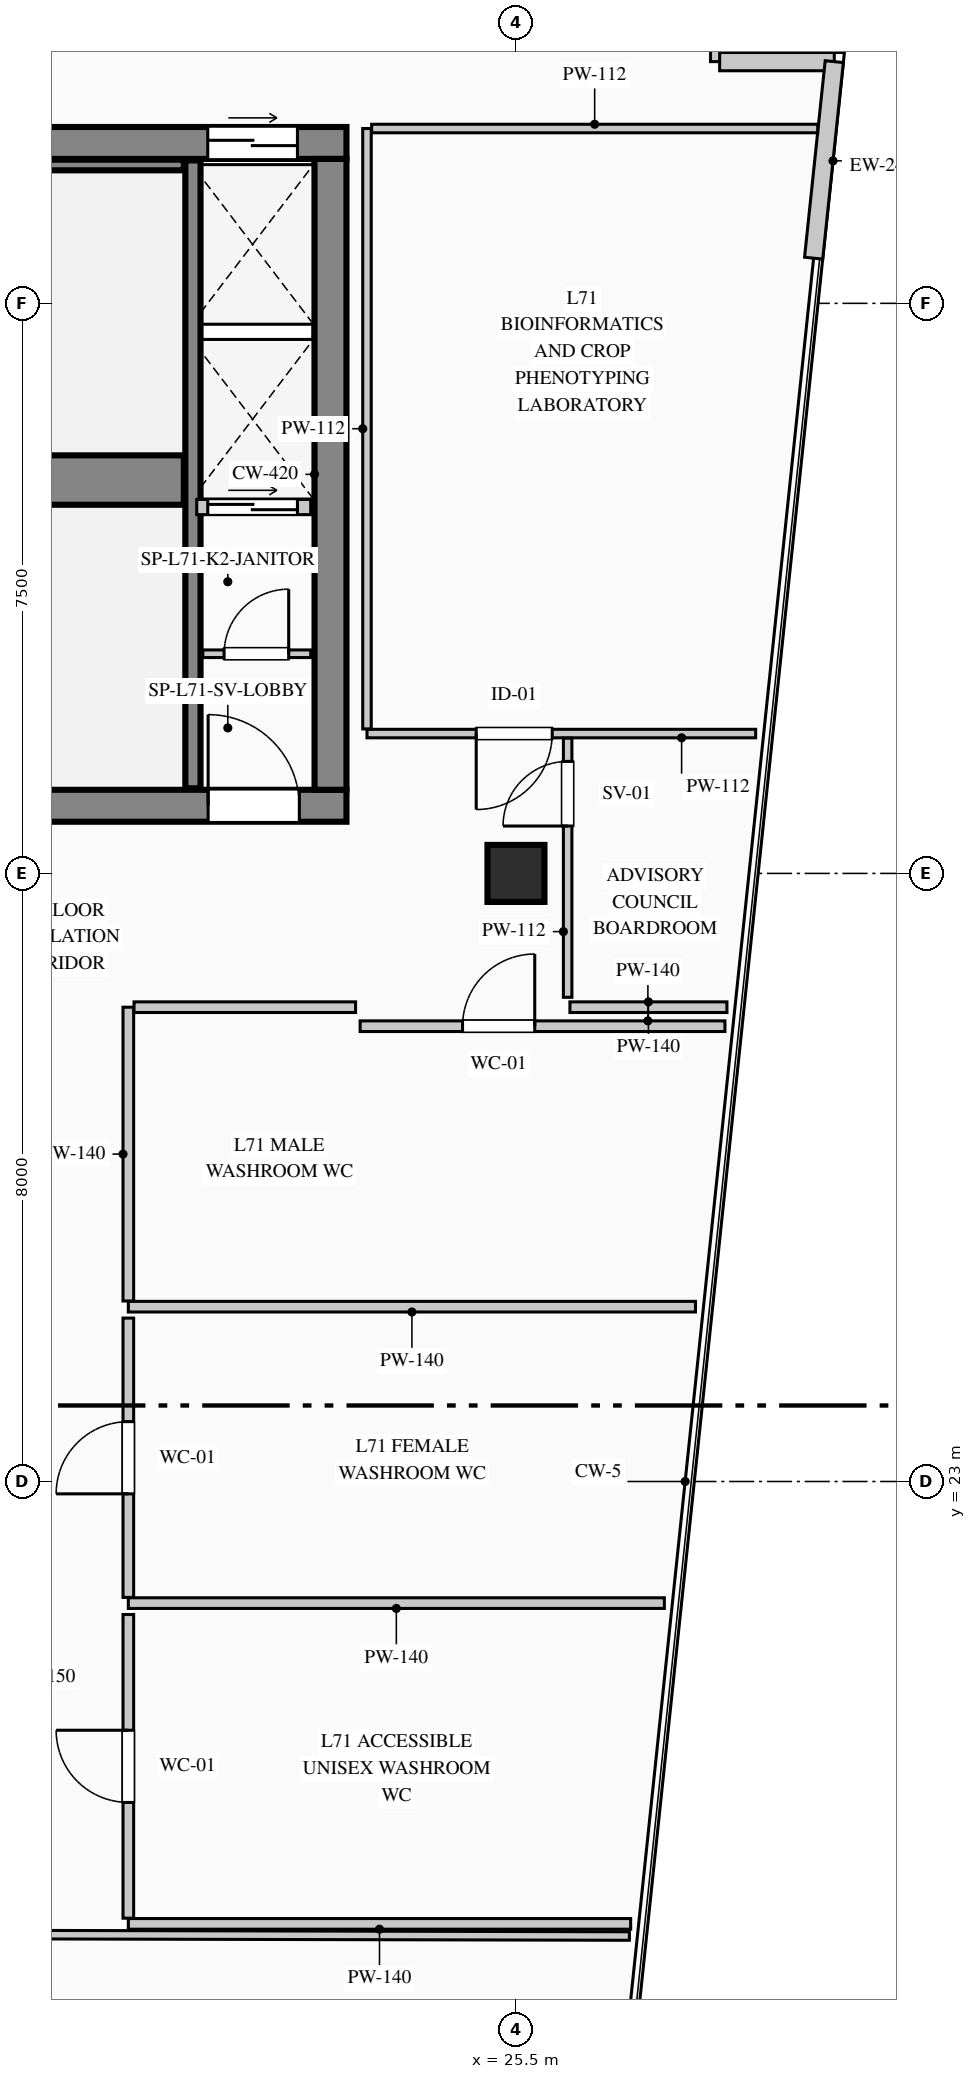
"""IFC4 building model, lengths in metres.
Left out: names, types, materials, properties, quantities, classifications, styles, units other than length and angle.
Written with IfcOpenShell. Run it as: python <this file> out.ifc"""

import sys

from ifc_helpers import new_model, si_unit, direction, frame, frame_2d, origin, origin_2d, place, context, subcontext, project, spatial, rectangle, extrude, element, fill, save


model = new_model("IFC4")
c1 = context("Model", 3, precision=1e-05, world=origin(), true_north=direction((0.0, 1.0)))
c2 = subcontext(c1, "Body", "Model", "MODEL_VIEW")
j1 = project(units=[si_unit("LENGTHUNIT", "METRE"), si_unit("PLANEANGLEUNIT", "RADIAN")], contexts=[c1])
p1 = place(None, origin())
s1 = spatial("IfcSite", under=j1, at=p1, CompositionType="ELEMENT")
p2 = place(p1, origin())
s2 = spatial("IfcBuilding", under=s1, at=p2, CompositionType="ELEMENT")
p3 = place(p2, frame((0.0, 0.0, 296.2)))
s3 = spatial("IfcBuildingStorey", under=s2, at=p3, CompositionType="ELEMENT", Elevation=296.2)
p4 = place(p3, frame((5.58, 40.61, 0.0), z_axis=(0.0, 0.0, 1.0), x_axis=(1.0, 0.0, 0.0)))
e1 = element("IfcWall", 1, at=p4, inside=s3, PredefinedType="SHEAR", context=c2, shape_type="SweptSolid", body=[
    extrude(rectangle(XDim=17.69, YDim=0.42, at=frame_2d((8.845, 0.0))), origin(), (0.0, 0.0, 1.0), 3.95),
])
p5 = place(p4, frame((15.865, 0.0, 0.0)))
e2 = element("IfcOpeningElement", 2, at=p5, cuts=e1, PredefinedType="OPENING", context=c2, shape_type="SweptSolid", body=[
    extrude(rectangle(XDim=1.18, YDim=2.25, at=frame_2d((0.59, 1.125))), frame((0.0, 0.22, 0.0), z_axis=(0.0, -1.0, 0.0), x_axis=(1.0, 0.0, 0.0)), (0.0, 0.0, 1.0), 0.44),
])
p6 = place(p3, frame((5.58, 31.89, 0.0), z_axis=(0.0, 0.0, 1.0), x_axis=(1.0, 0.0, 0.0)))
e3 = element("IfcWall", 3, at=p6, inside=s3, PredefinedType="SHEAR", context=c2, shape_type="SweptSolid", body=[
    extrude(rectangle(XDim=17.69, YDim=0.42, at=frame_2d((8.845, 0.0))), origin(), (0.0, 0.0, 1.0), 3.95),
])
p7 = place(p6, frame((3.07, 0.0, 0.0)))
e4 = element("IfcOpeningElement", 4, at=p7, cuts=e3, PredefinedType="OPENING", context=c2, shape_type="SweptSolid", body=[
    extrude(rectangle(XDim=1.2, YDim=2.2, at=frame_2d((0.6, 1.1))), frame((0.0, 0.22, 0.0), z_axis=(0.0, -1.0, 0.0), x_axis=(1.0, 0.0, 0.0)), (0.0, 0.0, 1.0), 0.44),
])
p8 = place(p6, frame((6.92, 0.0, 0.0)))
e5 = element("IfcOpeningElement", 5, at=p8, cuts=e3, PredefinedType="OPENING", context=c2, shape_type="SweptSolid", body=[
    extrude(rectangle(XDim=1.2, YDim=2.2, at=frame_2d((0.6, 1.1))), frame((0.0, 0.22, 0.0), z_axis=(0.0, -1.0, 0.0), x_axis=(1.0, 0.0, 0.0)), (0.0, 0.0, 1.0), 0.44),
])
p9 = place(p6, frame((8.77, 0.0, 0.0)))
e6 = element("IfcOpeningElement", 6, at=p9, cuts=e3, PredefinedType="OPENING", context=c2, shape_type="SweptSolid", body=[
    extrude(rectangle(XDim=1.15, YDim=2.2, at=frame_2d((0.575, 1.1))), frame((0.0, 0.22, 0.0), z_axis=(0.0, -1.0, 0.0), x_axis=(1.0, 0.0, 0.0)), (0.0, 0.0, 1.0), 0.44),
])
p10 = place(p6, frame((15.87, 0.0, 0.0)))
e7 = element("IfcOpeningElement", 7, at=p10, cuts=e3, PredefinedType="OPENING", context=c2, shape_type="SweptSolid", body=[
    extrude(rectangle(XDim=1.2, YDim=2.2, at=frame_2d((0.6, 1.1))), frame((0.0, 0.22, 0.0), z_axis=(0.0, -1.0, 0.0), x_axis=(1.0, 0.0, 0.0)), (0.0, 0.0, 1.0), 0.44),
])
p11 = place(p3, frame((23.06, 32.1, 0.0), z_axis=(0.0, 0.0, 1.0), x_axis=(0.0, 1.0, 0.0)))
e8 = element("IfcWall", 8, at=p11, inside=s3, PredefinedType="SHEAR", context=c2, shape_type="SweptSolid", body=[
    extrude(rectangle(XDim=8.3, YDim=0.42, at=frame_2d((4.15, 0.0))), origin(), (0.0, 0.0, 1.0), 3.95),
])
p12 = place(p3, frame((14.12, 36.175, 0.0), z_axis=(0.0, 0.0, 1.0), x_axis=(1.0, 0.0, 0.0)))
e9 = element("IfcWall", 9, at=p12, inside=s3, PredefinedType="SHEAR", context=c2, shape_type="SweptSolid", body=[
    extrude(rectangle(XDim=7.01, YDim=0.65, at=frame_2d((3.505, 0.0))), origin(), (0.0, 0.0, 1.0), 3.95),
])
p13 = place(p3, frame((21.25, 32.12, 0.0), z_axis=(0.0, 0.0, 1.0), x_axis=(0.0, 1.0, 0.0)))
e10 = element("IfcWall", 10, at=p13, inside=s3, PredefinedType="SHEAR", context=c2, shape_type="SweptSolid", body=[
    extrude(rectangle(XDim=8.26, YDim=0.2, at=frame_2d((4.13, 0.0))), origin(), (0.0, 0.0, 1.0), 3.95),
])
p14 = place(p3, frame((14.12, 40.32, 0.0), z_axis=(0.0, 0.0, 1.0), x_axis=(1.0, 0.0, 0.0)))
e11 = element("IfcWall", 11, at=p14, inside=s3, PredefinedType="SHEAR", context=c2, shape_type="SweptSolid", body=[
    extrude(rectangle(XDim=7.01, YDim=0.14, at=frame_2d((3.505, 0.0))), origin(), (0.0, 0.0, 1.0), 3.95),
])
p15 = place(p3, frame((25.5, 31.0, 0.0), z_axis=(0.0, 0.0, 1.0), x_axis=(1.0, 0.0, 0.0)))
e12 = element("IfcColumn", 12, at=p15, inside=s3, PredefinedType="COLUMN", context=c2, shape_type="SweptSolid", body=[
    extrude(rectangle(XDim=0.75, YDim=0.75, at=origin_2d()), origin(), (0.0, 0.0, 1.0), 3.95),
])
p16 = place(p3, frame((28.18, 43.38, 0.0), z_axis=(0.0, 0.0, 1.0), x_axis=(0.0, -1.0, 0.0)))
e13 = element("IfcWall", 13, at=p16, inside=s3, PredefinedType="STANDARD", context=c2, shape_type="SweptSolid", body=[
    extrude(rectangle(XDim=1.7, YDim=0.24, at=frame_2d((0.85, 0.0))), origin(), (0.0, 0.0, 1.0), 3.7),
])
p17 = place(p3, frame((28.18, 41.68, 0.0), z_axis=(0.0, 0.0, 1.0), x_axis=(1.0, 0.0, 0.0)))
e14 = element("IfcWall", 14, at=p17, inside=s3, PredefinedType="STANDARD", context=c2, shape_type="SweptSolid", body=[
    extrude(rectangle(XDim=1.508, YDim=0.24, at=frame_2d((0.754, 0.0))), origin(), (0.0, 0.0, 1.0), 3.7),
])
p18 = place(p3, frame((29.688, 41.68, 0.0), z_axis=(0.0, 0.0, 1.0), x_axis=(-0.104420821624, -0.994533203071, 0.0)))
e15 = element("IfcWall", 15, at=p18, inside=s3, PredefinedType="STANDARD", context=c2, shape_type="SweptSolid", body=[
    extrude(rectangle(XDim=2.6, YDim=0.24, at=frame_2d((1.3, 0.0))), origin(), (0.0, 0.0, 1.0), 3.7),
])
p19 = place(p3, frame((21.38, 33.89, 0.0), z_axis=(0.0, 0.0, 1.0), x_axis=(1.0, 0.0, 0.0)))
e16 = element("IfcWall", 16, at=p19, inside=s3, PredefinedType="PARTITIONING", context=c2, shape_type="SweptSolid", body=[
    extrude(rectangle(XDim=1.42, YDim=0.1, at=frame_2d((0.71, 0.0))), origin(), (0.0, 0.0, 1.0), 3.7),
])
p20 = place(p19, frame((0.28, 0.0, 0.0)))
e17 = element("IfcOpeningElement", 17, at=p20, cuts=e16, PredefinedType="OPENING", context=c2, shape_type="SweptSolid", body=[
    extrude(rectangle(XDim=0.85, YDim=2.1, at=frame_2d((0.425, 1.05))), frame((0.0, 0.06, 0.0), z_axis=(0.0, -1.0, 0.0), x_axis=(1.0, 0.0, 0.0)), (0.0, 0.0, 1.0), 0.12),
])
p21 = place(p3, frame((21.3, 35.82, 0.0), z_axis=(0.0, 0.0, 1.0), x_axis=(1.0, 0.0, 0.0)))
e18 = element("IfcWall", 18, at=p21, inside=s3, PredefinedType="PARTITIONING", context=c2, shape_type="SweptSolid", body=[
    extrude(rectangle(XDim=1.5, YDim=0.2, at=frame_2d((0.75, 0.0))), origin(), (0.0, 0.0, 1.0), 3.7),
])
p22 = place(p21, frame((0.145, 0.0, 0.0)))
e19 = element("IfcOpeningElement", 19, at=p22, cuts=e18, PredefinedType="OPENING", context=c2, shape_type="SweptSolid", body=[
    extrude(rectangle(XDim=1.18, YDim=2.25, at=frame_2d((0.59, 1.125))), frame((0.0, 0.11, 0.0), z_axis=(0.0, -1.0, 0.0), x_axis=(1.0, 0.0, 0.0)), (0.0, 0.0, 1.0), 0.22),
])
p23 = place(p3, frame((28.654, 32.84, 0.0), z_axis=(0.0, 0.0, 1.0), x_axis=(-1.0, 0.0, 0.0)))
e20 = element("IfcWall", 20, at=p23, inside=s3, PredefinedType="PARTITIONING", context=c2, shape_type="SweptSolid", body=[
    extrude(rectangle(XDim=5.114, YDim=0.112, at=frame_2d((2.557, 0.0))), origin(), (0.0, 0.0, 1.0), 3.7),
])
p24 = place(p23, frame((2.677, 0.0, 0.0)))
e21 = element("IfcOpeningElement", 21, at=p24, cuts=e20, PredefinedType="OPENING", context=c2, shape_type="SweptSolid", body=[
    extrude(rectangle(XDim=1.0, YDim=2.15, at=frame_2d((0.5, 1.075))), frame((0.0, 0.066, 0.0), z_axis=(0.0, -1.0, 0.0), x_axis=(1.0, 0.0, 0.0)), (0.0, 0.0, 1.0), 0.132),
])
p25 = place(p3, frame((23.54, 32.901, 0.0), z_axis=(0.0, 0.0, 1.0), x_axis=(0.0, 1.0, 0.0)))
e22 = element("IfcWall", 22, at=p25, inside=s3, PredefinedType="PARTITIONING", context=c2, shape_type="SweptSolid", body=[
    extrude(rectangle(XDim=7.899, YDim=0.112, at=frame_2d((3.95, 0.0))), origin(), (0.0, 0.0, 1.0), 3.7),
])
p26 = place(p3, frame((23.601, 40.8, 0.0), z_axis=(0.0, 0.0, 1.0), x_axis=(1.0, 0.0, 0.0)))
e23 = element("IfcWall", 23, at=p26, inside=s3, PredefinedType="PARTITIONING", context=c2, shape_type="SweptSolid", body=[
    extrude(rectangle(XDim=5.869, YDim=0.112, at=frame_2d((2.935, 0.0))), origin(), (0.0, 0.0, 1.0), 3.7),
])
p27 = place(p3, frame((23.45, 28.99, 0.0), z_axis=(0.0, 0.0, 1.0), x_axis=(1.0, 0.0, 0.0)))
e24 = element("IfcWall", 24, at=p27, inside=s3, PredefinedType="PARTITIONING", context=c2, shape_type="SweptSolid", body=[
    extrude(rectangle(XDim=4.8, YDim=0.14, at=frame_2d((2.4, 0.0))), origin(), (0.0, 0.0, 1.0), 3.7),
])
p28 = place(p27, frame((1.347, 0.0, 0.0)))
e25 = element("IfcOpeningElement", 25, at=p28, cuts=e24, PredefinedType="OPENING", context=c2, shape_type="SweptSolid", body=[
    extrude(rectangle(XDim=0.95, YDim=2.15, at=frame_2d((0.475, 1.075))), frame((0.0, 0.08, 0.0), z_axis=(0.0, -1.0, 0.0), x_axis=(1.0, 0.0, 0.0)), (0.0, 0.0, 1.0), 0.16),
])
p29 = place(p3, frame((26.21, 29.24, 0.0), z_axis=(0.0, 0.0, 1.0), x_axis=(1.0, 0.0, 0.0)))
e26 = element("IfcWall", 26, at=p29, inside=s3, PredefinedType="PARTITIONING", context=c2, shape_type="SweptSolid", body=[
    extrude(rectangle(XDim=2.066, YDim=0.14, at=frame_2d((1.033, 0.0))), origin(), (0.0, 0.0, 1.0), 3.7),
])
p30 = place(p3, frame((27.862, 25.3, 0.0), z_axis=(0.0, 0.0, 1.0), x_axis=(-1.0, 0.0, 0.0)))
e27 = element("IfcWall", 27, at=p30, inside=s3, PredefinedType="PARTITIONING", context=c2, shape_type="SweptSolid", body=[
    extrude(rectangle(XDim=7.462, YDim=0.14, at=frame_2d((3.731, 0.0))), origin(), (0.0, 0.0, 1.0), 3.7),
])
p31 = place(p3, frame((20.4, 25.375, 0.0), z_axis=(0.0, 0.0, 1.0), x_axis=(0.0, 1.0, 0.0)))
e28 = element("IfcWall", 28, at=p31, inside=s3, PredefinedType="PARTITIONING", context=c2, shape_type="SweptSolid", body=[
    extrude(rectangle(XDim=3.865, YDim=0.14, at=frame_2d((1.933, 0.0))), origin(), (0.0, 0.0, 1.0), 3.7),
])
p32 = place(p3, frame((20.475, 29.24, 0.0), z_axis=(0.0, 0.0, 1.0), x_axis=(1.0, 0.0, 0.0)))
e29 = element("IfcWall", 29, at=p32, inside=s3, PredefinedType="PARTITIONING", context=c2, shape_type="SweptSolid", body=[
    extrude(rectangle(XDim=2.915, YDim=0.14, at=frame_2d((1.458, 0.0))), origin(), (0.0, 0.0, 1.0), 3.7),
])
p33 = place(p3, frame((27.452, 21.4, 0.0), z_axis=(0.0, 0.0, 1.0), x_axis=(-1.0, 0.0, 0.0)))
e30 = element("IfcWall", 30, at=p33, inside=s3, PredefinedType="PARTITIONING", context=c2, shape_type="SweptSolid", body=[
    extrude(rectangle(XDim=7.052, YDim=0.14, at=frame_2d((3.526, 0.0))), origin(), (0.0, 0.0, 1.0), 3.7),
])
p34 = place(p3, frame((20.4, 21.475, 0.0), z_axis=(0.0, 0.0, 1.0), x_axis=(0.0, 1.0, 0.0)))
e31 = element("IfcWall", 31, at=p34, inside=s3, PredefinedType="PARTITIONING", context=c2, shape_type="SweptSolid", body=[
    extrude(rectangle(XDim=3.675, YDim=0.14, at=frame_2d((1.837, 0.0))), origin(), (0.0, 0.0, 1.0), 3.7),
])
p35 = place(p34, frame((1.363, 0.0, 0.0)))
e32 = element("IfcOpeningElement", 32, at=p35, cuts=e31, PredefinedType="OPENING", context=c2, shape_type="SweptSolid", body=[
    extrude(rectangle(XDim=0.95, YDim=2.15, at=frame_2d((0.475, 1.075))), frame((0.0, 0.08, 0.0), z_axis=(0.0, -1.0, 0.0), x_axis=(1.0, 0.0, 0.0)), (0.0, 0.0, 1.0), 0.16),
])
p36 = place(p3, frame((27.009, 17.18, 0.0), z_axis=(0.0, 0.0, 1.0), x_axis=(-1.0, 0.0, 0.0)))
e33 = element("IfcWall", 33, at=p36, inside=s3, PredefinedType="PARTITIONING", context=c2, shape_type="SweptSolid", body=[
    extrude(rectangle(XDim=6.609, YDim=0.14, at=frame_2d((3.305, 0.0))), origin(), (0.0, 0.0, 1.0), 3.7),
])
p37 = place(p3, frame((20.4, 17.255, 0.0), z_axis=(0.0, 0.0, 1.0), x_axis=(0.0, 1.0, 0.0)))
e34 = element("IfcWall", 34, at=p37, inside=s3, PredefinedType="PARTITIONING", context=c2, shape_type="SweptSolid", body=[
    extrude(rectangle(XDim=3.995, YDim=0.14, at=frame_2d((1.998, 0.0))), origin(), (0.0, 0.0, 1.0), 3.7),
])
p38 = place(p37, frame((1.522, 0.0, 0.0)))
e35 = element("IfcOpeningElement", 35, at=p38, cuts=e34, PredefinedType="OPENING", context=c2, shape_type="SweptSolid", body=[
    extrude(rectangle(XDim=0.95, YDim=2.15, at=frame_2d((0.475, 1.075))), frame((0.0, 0.08, 0.0), z_axis=(0.0, -1.0, 0.0), x_axis=(1.0, 0.0, 0.0)), (0.0, 0.0, 1.0), 0.16),
])
p39 = place(p3, frame((4.756, 17.071, 0.0), z_axis=(0.0, 0.0, 1.0), x_axis=(0.999997417422, -0.00227269645, 0.0)))
e36 = element("IfcWall", 36, at=p39, inside=s3, PredefinedType="PARTITIONING", context=c2, shape_type="SweptSolid", body=[
    extrude(rectangle(XDim=22.237, YDim=0.112, at=frame_2d((11.118, 0.0))), origin(), (0.0, 0.0, 1.0), 3.7),
])
p40 = place(p39, frame((10.618, 0.0, 0.0)))
e37 = element("IfcOpeningElement", 37, at=p40, cuts=e36, PredefinedType="OPENING", context=c2, shape_type="SweptSolid", body=[
    extrude(rectangle(XDim=1.0, YDim=2.15, at=frame_2d((0.5, 1.075))), frame((0.0, 0.066, 0.0), z_axis=(0.0, -1.0, 0.0), x_axis=(1.0, 0.0, 0.0)), (0.0, 0.0, 1.0), 0.132),
])
p41 = place(p3, frame((26.18, 29.37, 0.0), z_axis=(0.0, 0.0, 1.0), x_axis=(0.0, 1.0, 0.0)))
e38 = element("IfcWall", 38, at=p41, inside=s3, PredefinedType="PARTITIONING", context=c2, shape_type="SweptSolid", body=[
    extrude(rectangle(XDim=3.409, YDim=0.112, at=frame_2d((1.705, 0.0))), origin(), (0.0, 0.0, 1.0), 3.7),
])
p42 = place(p41, frame((2.253, 0.0, 0.0)))
e39 = element("IfcOpeningElement", 39, at=p42, cuts=e38, PredefinedType="OPENING", context=c2, shape_type="SweptSolid", body=[
    extrude(rectangle(XDim=0.85, YDim=2.1, at=frame_2d((0.425, 1.05))), frame((0.0, 0.066, 0.0), z_axis=(0.0, -1.0, 0.0), x_axis=(1.0, 0.0, 0.0)), (0.0, 0.0, 1.0), 0.132),
])
p43 = place(p10, origin())
e40 = element("IfcDoor", 40, at=p43, inside=s3, OperationType="SINGLE_SWING_LEFT", PredefinedType="DOOR", context=c2, shape_type="SweptSolid", body=[
    extrude(rectangle(XDim=1.2, YDim=2.2, at=frame_2d((0.6, 1.1))), frame((0.0, 0.025, 0.0), z_axis=(0.0, -1.0, 0.0), x_axis=(1.0, 0.0, 0.0)), (0.0, 0.0, 1.0), 0.05),
])
fill(e7, e40)
p44 = place(p20, origin())
e41 = element("IfcDoor", 41, at=p44, inside=s3, OperationType="SINGLE_SWING_RIGHT", PredefinedType="DOOR", context=c2, shape_type="SweptSolid", body=[
    extrude(rectangle(XDim=0.85, YDim=2.1, at=frame_2d((0.425, 1.05))), frame((0.0, 0.025, 0.0), z_axis=(0.0, -1.0, 0.0), x_axis=(1.0, 0.0, 0.0)), (0.0, 0.0, 1.0), 0.05),
])
fill(e17, e41)
p45 = place(p5, origin())
e42 = element("IfcDoor", 42, at=p45, inside=s3, OperationType="DOUBLE_DOOR_SLIDING", PredefinedType="DOOR", context=c2, shape_type="SweptSolid", body=[
    extrude(rectangle(XDim=1.18, YDim=2.25, at=frame_2d((0.59, 1.125))), frame((0.0, 0.025, 0.0), z_axis=(0.0, -1.0, 0.0), x_axis=(1.0, 0.0, 0.0)), (0.0, 0.0, 1.0), 0.05),
])
fill(e2, e42)
p46 = place(p22, origin())
e43 = element("IfcDoor", 43, at=p46, inside=s3, OperationType="DOUBLE_DOOR_SLIDING", PredefinedType="DOOR", context=c2, shape_type="SweptSolid", body=[
    extrude(rectangle(XDim=1.18, YDim=2.25, at=frame_2d((0.59, 1.125))), frame((0.0, 0.025, 0.0), z_axis=(0.0, -1.0, 0.0), x_axis=(1.0, 0.0, 0.0)), (0.0, 0.0, 1.0), 0.05),
])
fill(e19, e43)
p47 = place(p24, origin())
e44 = element("IfcDoor", 44, at=p47, inside=s3, OperationType="SINGLE_SWING_RIGHT", PredefinedType="DOOR", context=c2, shape_type="SweptSolid", body=[
    extrude(rectangle(XDim=1.0, YDim=2.15, at=frame_2d((0.5, 1.075))), frame((0.0, 0.025, 0.0), z_axis=(0.0, -1.0, 0.0), x_axis=(1.0, 0.0, 0.0)), (0.0, 0.0, 1.0), 0.05),
])
fill(e21, e44)
p48 = place(p28, origin())
e45 = element("IfcDoor", 45, at=p48, inside=s3, OperationType="SINGLE_SWING_RIGHT", PredefinedType="DOOR", context=c2, shape_type="SweptSolid", body=[
    extrude(rectangle(XDim=0.95, YDim=2.15, at=frame_2d((0.475, 1.075))), frame((0.0, 0.025, 0.0), z_axis=(0.0, -1.0, 0.0), x_axis=(1.0, 0.0, 0.0)), (0.0, 0.0, 1.0), 0.05),
])
fill(e25, e45)
p49 = place(p35, origin())
e46 = element("IfcDoor", 46, at=p49, inside=s3, OperationType="SINGLE_SWING_LEFT", PredefinedType="DOOR", context=c2, shape_type="SweptSolid", body=[
    extrude(rectangle(XDim=0.95, YDim=2.15, at=frame_2d((0.475, 1.075))), frame((0.0, 0.025, 0.0), z_axis=(0.0, -1.0, 0.0), x_axis=(1.0, 0.0, 0.0)), (0.0, 0.0, 1.0), 0.05),
])
fill(e32, e46)
p50 = place(p38, origin())
e47 = element("IfcDoor", 47, at=p50, inside=s3, OperationType="SINGLE_SWING_RIGHT", PredefinedType="DOOR", context=c2, shape_type="SweptSolid", body=[
    extrude(rectangle(XDim=0.95, YDim=2.15, at=frame_2d((0.475, 1.075))), frame((0.0, 0.025, 0.0), z_axis=(0.0, -1.0, 0.0), x_axis=(1.0, 0.0, 0.0)), (0.0, 0.0, 1.0), 0.05),
])
fill(e35, e47)
p51 = place(p42, origin())
e48 = element("IfcDoor", 48, at=p51, inside=s3, OperationType="SINGLE_SWING_LEFT", PredefinedType="DOOR", context=c2, shape_type="SweptSolid", body=[
    extrude(rectangle(XDim=0.85, YDim=2.1, at=frame_2d((0.425, 1.05))), frame((0.0, 0.025, 0.0), z_axis=(0.0, -1.0, 0.0), x_axis=(1.0, 0.0, 0.0)), (0.0, 0.0, 1.0), 0.05),
])
fill(e39, e48)
save(model, sys.argv[1])
